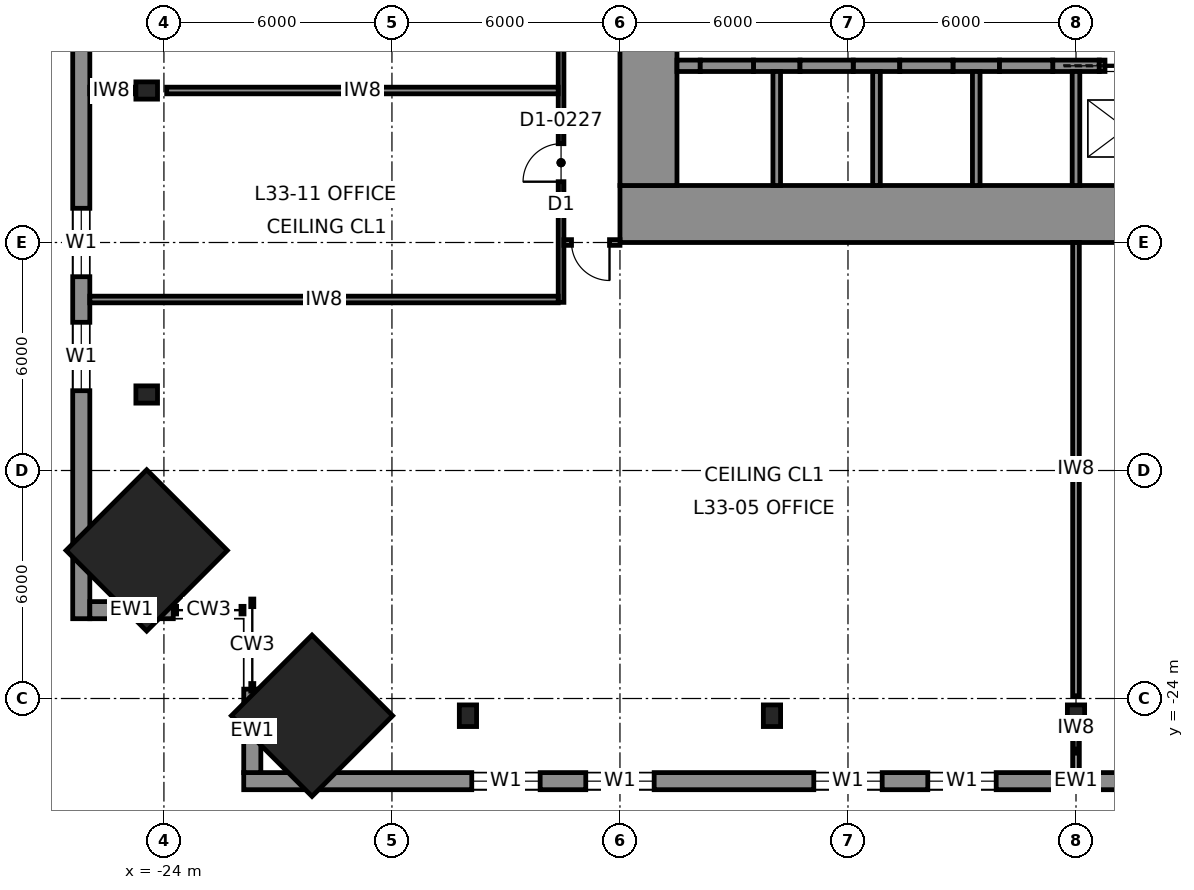
"""IFC4 building model, lengths in metres.
Left out: names, types, materials, properties, quantities, classifications, styles, units other than length and angle.
Written with IfcOpenShell. Run it as: python <this file> out.ifc"""

import sys

from ifc_helpers import new_model, si_unit, direction, frame, frame_2d, origin, origin_2d, place, context, subcontext, project, spatial, rectangle, i_section, extrude, element, fill, save


model = new_model("IFC4")
c1 = context("Model", 3, precision=1e-05, world=origin(), true_north=direction((0.0, 1.0)))
c2 = subcontext(c1, "Body", "Model", "MODEL_VIEW")
j1 = project(units=[si_unit("LENGTHUNIT", "METRE"), si_unit("PLANEANGLEUNIT", "RADIAN")], contexts=[c1])
p1 = place(None, origin())
s1 = spatial("IfcSite", under=j1, at=p1, CompositionType="ELEMENT")
p2 = place(p1, origin())
s2 = spatial("IfcBuilding", under=s1, at=p2, CompositionType="ELEMENT")
p3 = place(p2, frame((0.0, 0.0, 159.8)))
s3 = spatial("IfcBuildingStorey", under=s2, at=p3, CompositionType="ELEMENT", Elevation=159.8)
for number, where, z_axis, x_axis in (
    (1, (-20.103, -24.453, 0.0), (0.04, 0.04, 0.998), (-0.707, 0.708, 0.0)),
    (2, (-24.453, -20.103, 0.0), (0.04, 0.04, 0.998), (-0.708, 0.707, 0.0)),
):
    element("IfcColumn", number, at=place(p3, frame(where, z_axis=z_axis, x_axis=x_axis)), inside=s3, PredefinedType="COLUMN", context=c2, shape_type="SweptSolid", body=[
        extrude(rectangle(XDim=3.0, YDim=3.0, at=origin_2d()), origin(), (0.0, 0.0, 1.0), 4.007),
    ])
for number, where, z_axis, x_axis in (
    (3, (0.0, -24.453, 0.0), (0.0, 0.04, 0.999), (-1.0, 0.0, 0.0)),
    (4, (-8.0, -24.453, 0.0), (0.0, 0.04, 0.999), (-1.0, 0.0, 0.0)),
    (5, (-16.0, -24.453, 0.0), (0.0, 0.04, 0.999), (-1.0, 0.0, 0.0)),
    (6, (-24.453, -8.0, 0.0), (0.04, 0.0, 0.999), (0.0, 1.0, 0.0)),
    (7, (-24.453, -16.0, 0.0), (0.04, 0.0, 0.999), (0.0, 1.0, 0.0)),
):
    element("IfcColumn", number, at=place(p3, frame(where, z_axis=z_axis, x_axis=x_axis)), inside=s3, PredefinedType="COLUMN", context=c2, shape_type="SweptSolid", body=[
        extrude(i_section(OverallWidth=0.454, OverallDepth=0.569, WebThickness=0.078, FlangeThickness=0.125, at=origin_2d()), origin(), (0.0, 0.0, 1.0), 4.003),
    ])
p4 = place(p3, frame((12.0, -11.25, 0.0), z_axis=(0.0, 0.0, 1.0), x_axis=(-1.0, 0.0, 0.0)))
e8 = element("IfcWall", 8, at=p4, inside=s3, PredefinedType="SHEAR", context=c2, shape_type="SweptSolid", body=[
    extrude(rectangle(XDim=24.0, YDim=1.5, at=frame_2d((12.0, 0.0))), origin(), (0.0, 0.0, 1.0), 4.0),
])
p5 = place(p3, frame((-11.25, -10.5, 0.0), z_axis=(0.0, 0.0, 1.0), x_axis=(0.0, 1.0, 0.0)))
e9 = element("IfcWall", 9, at=p5, inside=s3, PredefinedType="SHEAR", context=c2, shape_type="SweptSolid", body=[
    extrude(rectangle(XDim=21.0, YDim=1.5, at=frame_2d((10.5, 0.0))), origin(), (0.0, 0.0, 1.0), 4.0),
])
p6 = place(p5, frame((16.1, 0.0, 0.0)))
e10 = element("IfcOpeningElement", 10, at=p6, cuts=e9, PredefinedType="OPENING", context=c2, shape_type="SweptSolid", body=[
    extrude(rectangle(XDim=1.2, YDim=2.3, at=frame_2d((0.6, 1.15))), frame((0.0, 0.76, 0.0), z_axis=(0.0, -1.0, 0.0), x_axis=(1.0, 0.0, 0.0)), (0.0, 0.0, 1.0), 1.52),
])
p7 = place(p5, frame((3.7, 0.0, 0.0)))
e11 = element("IfcOpeningElement", 11, at=p7, cuts=e9, PredefinedType="OPENING", context=c2, shape_type="SweptSolid", body=[
    extrude(rectangle(XDim=1.2, YDim=2.3, at=frame_2d((0.6, 1.15))), frame((0.0, 0.76, 0.0), z_axis=(0.0, -1.0, 0.0), x_axis=(1.0, 0.0, 0.0)), (0.0, 0.0, 1.0), 1.52),
])
p8 = place(p3, frame((-10.5, -7.35, 0.0), z_axis=(0.0, 0.0, 1.0), x_axis=(1.0, 0.0, 0.0)))
e12 = element("IfcWall", 12, at=p8, inside=s3, PredefinedType="SHEAR", context=c2, shape_type="SweptSolid", body=[
    extrude(rectangle(XDim=0.613, YDim=0.3, at=frame_2d((0.306, 0.0))), origin(), (0.0, 0.0, 1.0), 4.0),
])
for number, where, z_axis, x_axis in (
    (13, (-8.488, -7.35, 0.0), (0.0, 0.0, 1.0), (1.0, 0.0, 0.0)),
    (14, (-5.863, -7.35, 0.0), (0.0, 0.0, 1.0), (1.0, 0.0, 0.0)),
    (15, (-3.238, -7.35, 0.0), (0.0, 0.0, 1.0), (1.0, 0.0, 0.0)),
    (16, (-0.613, -7.35, 0.0), (0.0, 0.0, 1.0), (1.0, 0.0, 0.0)),
):
    element("IfcWall", number, at=place(p3, frame(where, z_axis=z_axis, x_axis=x_axis)), inside=s3, PredefinedType="SHEAR", context=c2, shape_type="SweptSolid", body=[
        extrude(rectangle(XDim=1.225, YDim=0.3, at=frame_2d((0.613, 0.0))), origin(), (0.0, 0.0, 1.0), 4.0),
    ])
for number, where, z_axis, x_axis in (
    (17, (-9.887, -7.35, 0.0), (0.0, 0.0, 1.0), (1.0, 0.0, 0.0)),
    (18, (-7.262, -7.35, 0.0), (0.0, 0.0, 1.0), (1.0, 0.0, 0.0)),
    (19, (-4.637, -7.35, 0.0), (0.0, 0.0, 1.0), (1.0, 0.0, 0.0)),
    (20, (-2.012, -7.35, 0.0), (0.0, 0.0, 1.0), (1.0, 0.0, 0.0)),
):
    element("IfcWall", number, at=place(p3, frame(where, z_axis=z_axis, x_axis=x_axis)), inside=s3, PredefinedType="PARTITIONING", context=c2, shape_type="SweptSolid", body=[
        extrude(rectangle(XDim=1.4, YDim=0.3, at=frame_2d((0.7, 0.0))), origin(), (0.0, 0.0, 1.0), 4.0),
    ])
p9 = place(p3, frame((0.613, -7.35, 0.0), z_axis=(0.0, 0.0, 1.0), x_axis=(1.0, 0.0, 0.0)))
e21 = element("IfcWall", 21, at=p9, inside=s3, PredefinedType="PARTITIONING", context=c2, shape_type="SweptSolid", body=[
    extrude(rectangle(XDim=1.4, YDim=0.3, at=frame_2d((0.7, 0.0))), origin(), (0.0, 0.0, 1.0), 4.0),
])
p10 = place(p9, frame((0.15, 0.0, 0.0)))
e22 = element("IfcOpeningElement", 22, at=p10, cuts=e21, PredefinedType="OPENING", context=c2, shape_type="SweptSolid", body=[
    extrude(rectangle(XDim=1.1, YDim=2.3, at=frame_2d((0.55, 1.15))), frame((0.0, 0.16, 0.0), z_axis=(0.0, -1.0, 0.0), x_axis=(1.0, 0.0, 0.0)), (0.0, 0.0, 1.0), 0.32),
])
for number, where, z_axis, x_axis in (
    (23, (-7.875, -10.5, 0.0), (0.0, 0.0, 1.0), (0.0, 1.0, 0.0)),
    (24, (-5.25, -10.5, 0.0), (0.0, 0.0, 1.0), (0.0, 1.0, 0.0)),
    (25, (-2.625, -10.5, 0.0), (0.0, 0.0, 1.0), (0.0, 1.0, 0.0)),
    (26, (0.0, -10.5, 0.0), (0.0, 0.0, 1.0), (0.0, 1.0, 0.0)),
):
    element("IfcWall", number, at=place(p3, frame(where, z_axis=z_axis, x_axis=x_axis)), inside=s3, PredefinedType="PARTITIONING", context=c2, shape_type="SweptSolid", body=[
        extrude(rectangle(XDim=3.0, YDim=0.2, at=frame_2d((1.5, 0.0))), origin(), (0.0, 0.0, 1.0), 4.0),
    ])
p11 = place(p3, frame((-21.9, -26.175, 0.0), z_axis=(0.0, 0.0, 1.0), x_axis=(1.0, 0.0, 0.0)))
e27 = element("IfcWall", 27, at=p11, inside=s3, PredefinedType="SOLIDWALL", context=c2, shape_type="SweptSolid", body=[
    extrude(rectangle(XDim=43.8, YDim=0.45, at=frame_2d((21.9, 0.0))), origin(), (0.0, 0.0, 1.0), 3.83),
])
p12 = place(p11, frame((6.0, 0.0, 0.7)))
e28 = element("IfcOpeningElement", 28, at=p12, cuts=e27, PredefinedType="OPENING", context=c2, shape_type="SweptSolid", body=[
    extrude(rectangle(XDim=1.8, YDim=2.6, at=frame_2d((0.9, 1.3))), frame((0.0, 0.235, 0.0), z_axis=(0.0, -1.0, 0.0), x_axis=(1.0, 0.0, 0.0)), (0.0, 0.0, 1.0), 0.47),
])
p13 = place(p11, frame((9.0, 0.0, 0.7)))
e29 = element("IfcOpeningElement", 29, at=p13, cuts=e27, PredefinedType="OPENING", context=c2, shape_type="SweptSolid", body=[
    extrude(rectangle(XDim=1.8, YDim=2.6, at=frame_2d((0.9, 1.3))), frame((0.0, 0.235, 0.0), z_axis=(0.0, -1.0, 0.0), x_axis=(1.0, 0.0, 0.0)), (0.0, 0.0, 1.0), 0.47),
])
p14 = place(p11, frame((15.0, 0.0, 0.7)))
e30 = element("IfcOpeningElement", 30, at=p14, cuts=e27, PredefinedType="OPENING", context=c2, shape_type="SweptSolid", body=[
    extrude(rectangle(XDim=1.8, YDim=2.6, at=frame_2d((0.9, 1.3))), frame((0.0, 0.235, 0.0), z_axis=(0.0, -1.0, 0.0), x_axis=(1.0, 0.0, 0.0)), (0.0, 0.0, 1.0), 0.47),
])
p15 = place(p11, frame((18.0, 0.0, 0.7)))
e31 = element("IfcOpeningElement", 31, at=p15, cuts=e27, PredefinedType="OPENING", context=c2, shape_type="SweptSolid", body=[
    extrude(rectangle(XDim=1.8, YDim=2.6, at=frame_2d((0.9, 1.3))), frame((0.0, 0.235, 0.0), z_axis=(0.0, -1.0, 0.0), x_axis=(1.0, 0.0, 0.0)), (0.0, 0.0, 1.0), 0.47),
])
p16 = place(p11, frame((24.0, 0.0, 0.7)))
e32 = element("IfcOpeningElement", 32, at=p16, cuts=e27, PredefinedType="OPENING", context=c2, shape_type="SweptSolid", body=[
    extrude(rectangle(XDim=1.8, YDim=2.6, at=frame_2d((0.9, 1.3))), frame((0.0, 0.235, 0.0), z_axis=(0.0, -1.0, 0.0), x_axis=(1.0, 0.0, 0.0)), (0.0, 0.0, 1.0), 0.47),
])
p17 = place(p11, frame((27.0, 0.0, 0.7)))
e33 = element("IfcOpeningElement", 33, at=p17, cuts=e27, PredefinedType="OPENING", context=c2, shape_type="SweptSolid", body=[
    extrude(rectangle(XDim=1.8, YDim=2.6, at=frame_2d((0.9, 1.3))), frame((0.0, 0.235, 0.0), z_axis=(0.0, -1.0, 0.0), x_axis=(1.0, 0.0, 0.0)), (0.0, 0.0, 1.0), 0.47),
])
p18 = place(p11, frame((33.0, 0.0, 0.7)))
e34 = element("IfcOpeningElement", 34, at=p18, cuts=e27, PredefinedType="OPENING", context=c2, shape_type="SweptSolid", body=[
    extrude(rectangle(XDim=1.8, YDim=2.6, at=frame_2d((0.9, 1.3))), frame((0.0, 0.235, 0.0), z_axis=(0.0, -1.0, 0.0), x_axis=(1.0, 0.0, 0.0)), (0.0, 0.0, 1.0), 0.47),
])
p19 = place(p11, frame((36.0, 0.0, 0.7)))
e35 = element("IfcOpeningElement", 35, at=p19, cuts=e27, PredefinedType="OPENING", context=c2, shape_type="SweptSolid", body=[
    extrude(rectangle(XDim=1.8, YDim=2.6, at=frame_2d((0.9, 1.3))), frame((0.0, 0.235, 0.0), z_axis=(0.0, -1.0, 0.0), x_axis=(1.0, 0.0, 0.0)), (0.0, 0.0, 1.0), 0.47),
])
p20 = place(p3, frame((-26.175, 21.9, 0.0), z_axis=(0.0, 0.0, 1.0), x_axis=(0.0, -1.0, 0.0)))
e36 = element("IfcWall", 36, at=p20, inside=s3, PredefinedType="SOLIDWALL", context=c2, shape_type="SweptSolid", body=[
    extrude(rectangle(XDim=43.8, YDim=0.45, at=frame_2d((21.9, 0.0))), origin(), (0.0, 0.0, 1.0), 3.83),
])
p21 = place(p20, frame((6.0, 0.0, 0.7)))
e37 = element("IfcOpeningElement", 37, at=p21, cuts=e36, PredefinedType="OPENING", context=c2, shape_type="SweptSolid", body=[
    extrude(rectangle(XDim=1.8, YDim=2.6, at=frame_2d((0.9, 1.3))), frame((0.0, 0.235, 0.0), z_axis=(0.0, -1.0, 0.0), x_axis=(1.0, 0.0, 0.0)), (0.0, 0.0, 1.0), 0.47),
])
p22 = place(p20, frame((9.0, 0.0, 0.7)))
e38 = element("IfcOpeningElement", 38, at=p22, cuts=e36, PredefinedType="OPENING", context=c2, shape_type="SweptSolid", body=[
    extrude(rectangle(XDim=1.8, YDim=2.6, at=frame_2d((0.9, 1.3))), frame((0.0, 0.235, 0.0), z_axis=(0.0, -1.0, 0.0), x_axis=(1.0, 0.0, 0.0)), (0.0, 0.0, 1.0), 0.47),
])
p23 = place(p20, frame((15.0, 0.0, 0.7)))
e39 = element("IfcOpeningElement", 39, at=p23, cuts=e36, PredefinedType="OPENING", context=c2, shape_type="SweptSolid", body=[
    extrude(rectangle(XDim=1.8, YDim=2.6, at=frame_2d((0.9, 1.3))), frame((0.0, 0.235, 0.0), z_axis=(0.0, -1.0, 0.0), x_axis=(1.0, 0.0, 0.0)), (0.0, 0.0, 1.0), 0.47),
])
p24 = place(p20, frame((18.0, 0.0, 0.7)))
e40 = element("IfcOpeningElement", 40, at=p24, cuts=e36, PredefinedType="OPENING", context=c2, shape_type="SweptSolid", body=[
    extrude(rectangle(XDim=1.8, YDim=2.6, at=frame_2d((0.9, 1.3))), frame((0.0, 0.235, 0.0), z_axis=(0.0, -1.0, 0.0), x_axis=(1.0, 0.0, 0.0)), (0.0, 0.0, 1.0), 0.47),
])
p25 = place(p20, frame((24.0, 0.0, 0.7)))
e41 = element("IfcOpeningElement", 41, at=p25, cuts=e36, PredefinedType="OPENING", context=c2, shape_type="SweptSolid", body=[
    extrude(rectangle(XDim=1.8, YDim=2.6, at=frame_2d((0.9, 1.3))), frame((0.0, 0.235, 0.0), z_axis=(0.0, -1.0, 0.0), x_axis=(1.0, 0.0, 0.0)), (0.0, 0.0, 1.0), 0.47),
])
p26 = place(p20, frame((27.0, 0.0, 0.7)))
e42 = element("IfcOpeningElement", 42, at=p26, cuts=e36, PredefinedType="OPENING", context=c2, shape_type="SweptSolid", body=[
    extrude(rectangle(XDim=1.8, YDim=2.6, at=frame_2d((0.9, 1.3))), frame((0.0, 0.235, 0.0), z_axis=(0.0, -1.0, 0.0), x_axis=(1.0, 0.0, 0.0)), (0.0, 0.0, 1.0), 0.47),
])
p27 = place(p20, frame((33.0, 0.0, 0.7)))
e43 = element("IfcOpeningElement", 43, at=p27, cuts=e36, PredefinedType="OPENING", context=c2, shape_type="SweptSolid", body=[
    extrude(rectangle(XDim=1.8, YDim=2.6, at=frame_2d((0.9, 1.3))), frame((0.0, 0.235, 0.0), z_axis=(0.0, -1.0, 0.0), x_axis=(1.0, 0.0, 0.0)), (0.0, 0.0, 1.0), 0.47),
])
p28 = place(p20, frame((36.0, 0.0, 0.7)))
e44 = element("IfcOpeningElement", 44, at=p28, cuts=e36, PredefinedType="OPENING", context=c2, shape_type="SweptSolid", body=[
    extrude(rectangle(XDim=1.8, YDim=2.6, at=frame_2d((0.9, 1.3))), frame((0.0, 0.235, 0.0), z_axis=(0.0, -1.0, 0.0), x_axis=(1.0, 0.0, 0.0)), (0.0, 0.0, 1.0), 0.47),
])
for number, where, z_axis, x_axis in (
    (45, (-21.675, -23.754, 0.0), (0.0, 0.0, 1.0), (0.0, -1.0, 0.0)),
    (46, (-23.754, -21.675, 0.0), (0.0, 0.0, 1.0), (-1.0, 0.0, 0.0)),
):
    element("IfcWall", number, at=place(p3, frame(where, z_axis=z_axis, x_axis=x_axis)), inside=s3, PredefinedType="SOLIDWALL", context=c2, shape_type="SweptSolid", body=[
        extrude(rectangle(XDim=2.196, YDim=0.45, at=frame_2d((1.098, 0.0))), origin(), (0.0, 0.0, 1.0), 3.83),
    ])
p29 = place(p3, frame((-13.55, 13.475, 0.0), z_axis=(0.0, 0.0, 1.0), x_axis=(0.0, -1.0, 0.0)))
e47 = element("IfcWall", 47, at=p29, inside=s3, PredefinedType="PARTITIONING", context=c2, shape_type="SweptSolid", body=[
    extrude(rectangle(XDim=27.05, YDim=0.15, at=frame_2d((13.525, 0.0))), origin(), (0.0, 0.0, 1.0), 3.83),
])
p30 = place(p29, frame((22.875, 0.0, 0.0)))
e48 = element("IfcOpeningElement", 48, at=p30, cuts=e47, PredefinedType="OPENING", context=c2, shape_type="SweptSolid", body=[
    extrude(rectangle(XDim=1.0, YDim=2.3, at=frame_2d((0.5, 1.15))), frame((0.0, 0.085, 0.0), z_axis=(0.0, -1.0, 0.0), x_axis=(1.0, 0.0, 0.0)), (0.0, 0.0, 1.0), 0.17),
])
p31 = place(p29, frame((10.275, 0.0, 0.0)))
e49 = element("IfcOpeningElement", 49, at=p31, cuts=e47, PredefinedType="OPENING", context=c2, shape_type="SweptSolid", body=[
    extrude(rectangle(XDim=1.0, YDim=2.3, at=frame_2d((0.5, 1.15))), frame((0.0, 0.085, 0.0), z_axis=(0.0, -1.0, 0.0), x_axis=(1.0, 0.0, 0.0)), (0.0, 0.0, 1.0), 0.17),
])
p32 = place(p29, frame((2.275, 0.0, 0.0)))
e50 = element("IfcOpeningElement", 50, at=p32, cuts=e47, PredefinedType="OPENING", context=c2, shape_type="SweptSolid", body=[
    extrude(rectangle(XDim=1.0, YDim=2.3, at=frame_2d((0.5, 1.15))), frame((0.0, 0.085, 0.0), z_axis=(0.0, -1.0, 0.0), x_axis=(1.0, 0.0, 0.0)), (0.0, 0.0, 1.0), 0.17),
])
p33 = place(p29, frame((17.475, 0.0, 0.0)))
e51 = element("IfcOpeningElement", 51, at=p33, cuts=e47, PredefinedType="OPENING", context=c2, shape_type="SweptSolid", body=[
    extrude(rectangle(XDim=1.0, YDim=2.3, at=frame_2d((0.5, 1.15))), frame((0.0, 0.085, 0.0), z_axis=(0.0, -1.0, 0.0), x_axis=(1.0, 0.0, 0.0)), (0.0, 0.0, 1.0), 0.17),
])
p34 = place(p3, frame((-12.0, -12.0, 0.0), z_axis=(0.0, 0.0, 1.0), x_axis=(-1.0, 0.0, 0.0)))
e52 = element("IfcWall", 52, at=p34, inside=s3, PredefinedType="PARTITIONING", context=c2, shape_type="SweptSolid", body=[
    extrude(rectangle(XDim=1.475, YDim=0.15, at=frame_2d((0.738, 0.0))), origin(), (0.0, 0.0, 1.0), 3.83),
])
p35 = place(p34, frame((0.275, 0.0, 0.0)))
e53 = element("IfcOpeningElement", 53, at=p35, cuts=e52, PredefinedType="OPENING", context=c2, shape_type="SweptSolid", body=[
    extrude(rectangle(XDim=1.0, YDim=2.3, at=frame_2d((0.5, 1.15))), frame((0.0, 0.085, 0.0), z_axis=(0.0, -1.0, 0.0), x_axis=(1.0, 0.0, 0.0)), (0.0, 0.0, 1.0), 0.17),
])
p36 = place(p3, frame((-13.625, -13.5, 0.0), z_axis=(0.0, 0.0, 1.0), x_axis=(-1.0, 0.0, 0.0)))
e54 = element("IfcWall", 54, at=p36, inside=s3, PredefinedType="PARTITIONING", context=c2, shape_type="SweptSolid", body=[
    extrude(rectangle(XDim=12.325, YDim=0.175, at=frame_2d((6.163, 0.0))), origin(), (0.0, 0.0, 1.0), 3.83),
])
p37 = place(p3, frame((0.0, -12.0, 0.0), z_axis=(0.0, 0.0, 1.0), x_axis=(0.0, -1.0, 0.0)))
e55 = element("IfcWall", 55, at=p37, inside=s3, PredefinedType="PARTITIONING", context=c2, shape_type="SweptSolid", body=[
    extrude(rectangle(XDim=11.928, YDim=0.175, at=frame_2d((5.964, 0.0))), origin(), (0.0, 0.0, 1.0), 2.84),
])
p38 = place(p3, frame((0.0, -24.817, 0.0), z_axis=(0.0, 0.0, 1.0), x_axis=(0.0, -1.0, 0.0)))
e56 = element("IfcWall", 56, at=p38, inside=s3, PredefinedType="PARTITIONING", context=c2, shape_type="SweptSolid", body=[
    extrude(rectangle(XDim=1.133, YDim=0.175, at=frame_2d((0.566, 0.0))), origin(), (0.0, 0.0, 1.0), 3.83),
])
p39 = place(p3, frame((-13.625, -8.0, 0.0), z_axis=(0.0, 0.0, 1.0), x_axis=(-1.0, 0.0, 0.0)))
e57 = element("IfcWall", 57, at=p39, inside=s3, PredefinedType="PARTITIONING", context=c2, shape_type="SweptSolid", body=[
    extrude(rectangle(XDim=10.303, YDim=0.175, at=frame_2d((5.151, 0.0))), origin(), (0.0, 0.0, 1.0), 2.84),
])
p40 = place(p3, frame((-24.817, -8.0, 0.0), z_axis=(0.0, 0.0, 1.0), x_axis=(-1.0, 0.0, 0.0)))
e58 = element("IfcWall", 58, at=p40, inside=s3, PredefinedType="PARTITIONING", context=c2, shape_type="SweptSolid", body=[
    extrude(rectangle(XDim=1.133, YDim=0.175, at=frame_2d((0.566, 0.0))), origin(), (0.0, 0.0, 1.0), 3.83),
])
p41 = place(p12, origin())
e59 = element("IfcWindow", 59, at=p41, inside=s3, PartitioningType="SINGLE_PANEL", PredefinedType="WINDOW", context=c2, shape_type="SweptSolid", body=[
    extrude(rectangle(XDim=1.8, YDim=2.6, at=frame_2d((0.9, 1.3))), frame((0.0, 0.03, 0.0), z_axis=(0.0, -1.0, 0.0), x_axis=(1.0, 0.0, 0.0)), (0.0, 0.0, 1.0), 0.06),
])
fill(e28, e59)
p42 = place(p13, origin())
e60 = element("IfcWindow", 60, at=p42, inside=s3, PartitioningType="SINGLE_PANEL", PredefinedType="WINDOW", context=c2, shape_type="SweptSolid", body=[
    extrude(rectangle(XDim=1.8, YDim=2.6, at=frame_2d((0.9, 1.3))), frame((0.0, 0.03, 0.0), z_axis=(0.0, -1.0, 0.0), x_axis=(1.0, 0.0, 0.0)), (0.0, 0.0, 1.0), 0.06),
])
fill(e29, e60)
p43 = place(p14, origin())
e61 = element("IfcWindow", 61, at=p43, inside=s3, PartitioningType="SINGLE_PANEL", PredefinedType="WINDOW", context=c2, shape_type="SweptSolid", body=[
    extrude(rectangle(XDim=1.8, YDim=2.6, at=frame_2d((0.9, 1.3))), frame((0.0, 0.03, 0.0), z_axis=(0.0, -1.0, 0.0), x_axis=(1.0, 0.0, 0.0)), (0.0, 0.0, 1.0), 0.06),
])
fill(e30, e61)
p44 = place(p15, origin())
e62 = element("IfcWindow", 62, at=p44, inside=s3, PartitioningType="SINGLE_PANEL", PredefinedType="WINDOW", context=c2, shape_type="SweptSolid", body=[
    extrude(rectangle(XDim=1.8, YDim=2.6, at=frame_2d((0.9, 1.3))), frame((0.0, 0.03, 0.0), z_axis=(0.0, -1.0, 0.0), x_axis=(1.0, 0.0, 0.0)), (0.0, 0.0, 1.0), 0.06),
])
fill(e31, e62)
p45 = place(p27, origin())
e63 = element("IfcWindow", 63, at=p45, inside=s3, PartitioningType="SINGLE_PANEL", PredefinedType="WINDOW", context=c2, shape_type="SweptSolid", body=[
    extrude(rectangle(XDim=1.8, YDim=2.6, at=frame_2d((0.9, 1.3))), frame((0.0, 0.03, 0.0), z_axis=(0.0, -1.0, 0.0), x_axis=(1.0, 0.0, 0.0)), (0.0, 0.0, 1.0), 0.06),
])
fill(e43, e63)
p46 = place(p28, origin())
e64 = element("IfcWindow", 64, at=p46, inside=s3, PartitioningType="SINGLE_PANEL", PredefinedType="WINDOW", context=c2, shape_type="SweptSolid", body=[
    extrude(rectangle(XDim=1.8, YDim=2.6, at=frame_2d((0.9, 1.3))), frame((0.0, 0.03, 0.0), z_axis=(0.0, -1.0, 0.0), x_axis=(1.0, 0.0, 0.0)), (0.0, 0.0, 1.0), 0.06),
])
fill(e44, e64)
p47 = place(p35, origin())
e65 = element("IfcDoor", 65, at=p47, inside=s3, OperationType="SINGLE_SWING_LEFT", PredefinedType="DOOR", context=c2, shape_type="SweptSolid", body=[
    extrude(rectangle(XDim=1.0, YDim=2.3, at=frame_2d((0.5, 1.15))), frame((0.0, 0.025, 0.0), z_axis=(0.0, -1.0, 0.0), x_axis=(1.0, 0.0, 0.0)), (0.0, 0.0, 1.0), 0.05),
])
fill(e53, e65)
p48 = place(p30, frame((1.0, 0.0, 0.0), z_axis=(0.0, 0.0, 1.0), x_axis=(-1.0, 0.0, 0.0)))
e66 = element("IfcDoor", 66, at=p48, inside=s3, OperationType="SINGLE_SWING_LEFT", PredefinedType="DOOR", context=c2, shape_type="SweptSolid", body=[
    extrude(rectangle(XDim=1.0, YDim=2.3, at=frame_2d((0.5, 1.15))), frame((0.0, 0.025, 0.0), z_axis=(0.0, -1.0, 0.0), x_axis=(1.0, 0.0, 0.0)), (0.0, 0.0, 1.0), 0.05),
])
fill(e48, e66)
p49 = place(p10, origin())
e67 = element("IfcDoor", 67, at=p49, inside=s3, OperationType="SLIDING_TO_LEFT", PredefinedType="DOOR", context=c2, shape_type="SweptSolid", body=[
    extrude(rectangle(XDim=1.1, YDim=2.3, at=frame_2d((0.55, 1.15))), frame((0.0, 0.025, 0.0), z_axis=(0.0, -1.0, 0.0), x_axis=(1.0, 0.0, 0.0)), (0.0, 0.0, 1.0), 0.05),
])
fill(e22, e67)
save(model, sys.argv[1])
